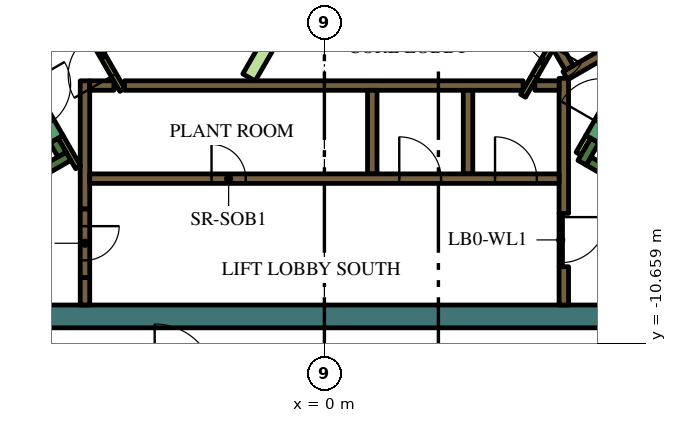
"""IFC4 building model, lengths in metres.
Left out: names, types, materials, properties, quantities, classifications, styles, units other than length and angle.
Written with IfcOpenShell. Run it as: python <this file> out.ifc"""

import sys

from ifc_helpers import new_model, si_unit, direction, frame, frame_2d, origin, origin_2d, place, context, subcontext, project, spatial, polyline, rectangle, outline, extrude, element, fill, save


model = new_model("IFC4")
c1 = context("Model", 3, precision=1e-05, world=origin(), true_north=direction((0.0, 1.0)))
c2 = subcontext(c1, "Body", "Model", "MODEL_VIEW")
j1 = project(units=[si_unit("LENGTHUNIT", "METRE"), si_unit("PLANEANGLEUNIT", "RADIAN")], contexts=[c1])
p1 = place(None, origin())
s1 = spatial("IfcSite", under=j1, at=p1, CompositionType="ELEMENT")
p2 = place(p1, origin())
s2 = spatial("IfcBuilding", under=s1, at=p2, CompositionType="ELEMENT")
p3 = place(p2, frame((0.0, 0.0, 344.4)))
s3 = spatial("IfcBuildingStorey", under=s2, at=p3, CompositionType="ELEMENT", Elevation=344.4)
p4 = place(p3, frame((8.904, -9.95, 0.0), z_axis=(0.0, 0.0, 1.0), x_axis=(-1.0, 0.0, 0.0)))
e1 = element("IfcWall", 1, at=p4, inside=s3, PredefinedType="SOLIDWALL", context=c2, shape_type="SweptSolid", body=[
    extrude(rectangle(XDim=22.161, YDim=0.6, at=frame_2d((11.081, 0.0))), origin(), (0.0, 0.0, 1.0), 4.2),
])
p5 = place(p3, frame((12.84, -9.261, 0.0), z_axis=(0.0, 0.0, 1.0), x_axis=(-0.866013990052, 0.500019768644, 0.0)))
e2 = element("IfcWall", 2, at=p5, inside=s3, PredefinedType="SOLIDWALL", context=c2, shape_type="SweptSolid", body=[
    extrude(rectangle(XDim=6.8, YDim=0.25, at=frame_2d((3.4, 0.0))), origin(), (0.0, 0.0, 1.0), 4.2),
])
p6 = place(p3, frame((6.78, -5.906, 0.0), z_axis=(0.0, 0.0, 1.0), x_axis=(0.500223362819, 0.865896406789, 0.0)))
e3 = element("IfcWall", 3, at=p6, inside=s3, PredefinedType="SOLIDWALL", context=c2, shape_type="SweptSolid", body=[
    extrude(rectangle(XDim=0.675, YDim=0.25, at=frame_2d((0.337, 0.0))), origin(), (0.0, 0.0, 1.0), 4.2),
])
p7 = place(p3, frame((-12.84, -9.261, 0.0), z_axis=(0.0, 0.0, 1.0), x_axis=(0.866016039709, 0.500016218704, 0.0)))
e4 = element("IfcWall", 4, at=p7, inside=s3, PredefinedType="SOLIDWALL", context=c2, shape_type="SweptSolid", body=[
    extrude(rectangle(XDim=7.05, YDim=0.25, at=frame_2d((3.525, 0.0))), origin(), (0.0, 0.0, 1.0), 4.2),
])
p8 = place(p3, frame((-6.905, -5.69, 0.0), z_axis=(0.0, 0.0, 1.0), x_axis=(-0.500402024738, 0.865793170242, 0.0)))
e5 = element("IfcWall", 5, at=p8, inside=s3, PredefinedType="SOLIDWALL", context=c2, shape_type="SweptSolid", body=[
    extrude(rectangle(XDim=0.425, YDim=0.25, at=frame_2d((0.212, 0.0))), origin(), (0.0, 0.0, 1.0), 4.2),
])
p9 = place(p3, frame((6.3, -7.24, 0.0), z_axis=(0.0, 0.0, 1.0), x_axis=(0.0, 1.0, 0.0)))
e6 = element("IfcWall", 6, at=p9, inside=s3, PredefinedType="SOLIDWALL", context=c2, shape_type="SweptSolid", body=[
    extrude(rectangle(XDim=3.556, YDim=0.25, at=frame_2d((1.778, 0.0))), origin(), (0.0, 0.0, 1.0), 4.2),
])
p10 = place(p3, frame((6.3, -9.65, 0.0), z_axis=(0.0, 0.0, 1.0), x_axis=(0.0, 1.0, 0.0)))
e7 = element("IfcWall", 7, at=p10, inside=s3, PredefinedType="SOLIDWALL", context=c2, shape_type="SweptSolid", body=[
    extrude(rectangle(XDim=1.008, YDim=0.25, at=frame_2d((0.504, 0.0))), origin(), (0.0, 0.0, 1.0), 4.2),
])
p11 = place(p3, frame((5.538, -3.875, 0.0), z_axis=(0.0, 0.0, 1.0), x_axis=(1.0, 0.0, 0.0)))
e8 = element("IfcWall", 8, at=p11, inside=s3, PredefinedType="SOLIDWALL", context=c2, shape_type="SweptSolid", body=[
    extrude(rectangle(XDim=0.637, YDim=0.25, at=frame_2d((0.318, 0.0))), origin(), (0.0, 0.0, 1.0), 4.2),
])
p12 = place(p3, frame((-5.259, -3.875, 0.0), z_axis=(0.0, 0.0, 1.0), x_axis=(1.0, 0.0, 0.0)))
e9 = element("IfcWall", 9, at=p12, inside=s3, PredefinedType="SOLIDWALL", context=c2, shape_type="SweptSolid", body=[
    extrude(rectangle(XDim=10.489, YDim=0.25, at=frame_2d((5.244, 0.0))), origin(), (0.0, 0.0, 1.0), 4.2),
])
for number, where, z_axis, x_axis in (
    (10, (1.26, -4.0, 0.0), (0.0, 0.0, 1.0), (0.0, -1.0, 0.0)),
    (11, (3.78, -4.0, 0.0), (0.0, 0.0, 1.0), (0.0, -1.0, 0.0)),
):
    element("IfcWall", number, at=place(p3, frame(where, z_axis=z_axis, x_axis=x_axis)), inside=s3, PredefinedType="SOLIDWALL", context=c2, shape_type="SweptSolid", body=[
        extrude(rectangle(XDim=2.2, YDim=0.25, at=frame_2d((1.1, 0.0))), origin(), (0.0, 0.0, 1.0), 4.2),
    ])
p13 = place(p3, frame((-6.3, -7.125, 0.0), z_axis=(0.0, 0.0, 1.0), x_axis=(0.0, 1.0, 0.0)))
e12 = element("IfcWall", 12, at=p13, inside=s3, PredefinedType="SOLIDWALL", context=c2, shape_type="SweptSolid", body=[
    extrude(rectangle(XDim=3.375, YDim=0.25, at=frame_2d((1.687, 0.0))), origin(), (0.0, 0.0, 1.0), 4.2),
])
p14 = place(p3, frame((-6.175, -3.875, 0.0), z_axis=(0.0, 0.0, 1.0), x_axis=(1.0, 0.0, 0.0)))
e13 = element("IfcWall", 13, at=p14, inside=s3, PredefinedType="SOLIDWALL", context=c2, shape_type="SweptSolid", body=[
    extrude(rectangle(XDim=0.637, YDim=0.25, at=frame_2d((0.318, 0.0))), origin(), (0.0, 0.0, 1.0), 4.2),
])
p15 = place(p3, frame((-6.3, -8.925, 0.0), z_axis=(0.0, 0.0, 1.0), x_axis=(0.0, -1.0, 0.0)))
e14 = element("IfcWall", 14, at=p15, inside=s3, PredefinedType="SOLIDWALL", context=c2, shape_type="SweptSolid", body=[
    extrude(rectangle(XDim=0.725, YDim=0.25, at=frame_2d((0.363, 0.0))), origin(), (0.0, 0.0, 1.0), 4.2),
])
p16 = place(p3, frame((9.19, -1.969, 0.0), z_axis=(0.0, 0.0, 1.0), x_axis=(-0.866057109641, -0.499945079824, 0.0)))
e15 = element("IfcWall", 15, at=p16, inside=s3, PredefinedType="SOLIDWALL", context=c2, shape_type="SweptSolid", body=[
    extrude(rectangle(XDim=3.291, YDim=0.25, at=frame_2d((1.646, 0.0))), origin(), (0.0, 0.0, 1.0), 4.2),
])
p17 = place(p3, frame((6.13, -2.867, 0.0), z_axis=(0.0, 0.0, 1.0), x_axis=(0.500160776593, -0.865932559475, 0.0)))
e16 = element("IfcWall", 16, at=p17, inside=s3, PredefinedType="SOLIDWALL", context=c2, shape_type="SweptSolid", body=[
    extrude(rectangle(XDim=0.627, YDim=0.25, at=frame_2d((0.313, 0.0))), origin(), (0.0, 0.0, 1.0), 4.2),
])
p18 = place(p3, frame((-6.48, -6.027, 0.0), z_axis=(0.0, 0.0, 1.0), x_axis=(-0.499927229454, 0.866067413802, 0.0)))
e17 = element("IfcWall", 17, at=p18, inside=s3, PredefinedType="PARTITIONING", context=c2, shape_type="SweptSolid", body=[
    extrude(rectangle(XDim=0.929, YDim=0.15, at=frame_2d((0.464, 0.0))), origin(), (0.0, 0.0, 1.0), 4.2),
])
p19 = place(p3, frame((6.945, -5.222, 0.0), z_axis=(0.0, 0.0, 1.0), x_axis=(-0.499818422106, -0.866130212453, 0.0)))
e18 = element("IfcWall", 18, at=p19, inside=s3, PredefinedType="PARTITIONING", context=c2, shape_type="SweptSolid", body=[
    extrude(rectangle(XDim=0.514, YDim=0.15, at=frame_2d((0.257, 0.0))), origin(), (0.0, 0.0, 1.0), 3.3),
])
p20 = place(p3, origin())
e19 = element("IfcWall", 19, at=p20, inside=s3, PredefinedType="PARTITIONING", context=c2, shape_type="SweptSolid", body=[
    extrude(outline(polyline([(2.017, 3.643), (2.342, 3.456), (-1.822, -3.756), (-2.147, -3.568), (2.017, 3.643)])), origin(), (0.0, 0.0, 1.0), 3.3),
])
p21 = place(p3, frame((-6.175, -6.325, 0.0), z_axis=(0.0, 0.0, 1.0), x_axis=(1.0, 0.0, 0.0)))
e20 = element("IfcWall", 20, at=p21, inside=s3, PredefinedType="SOLIDWALL", context=c2, shape_type="SweptSolid", body=[
    extrude(rectangle(XDim=12.35, YDim=0.25, at=frame_2d((6.175, 0.0))), origin(), (0.0, 0.0, 1.0), 4.2),
])
p22 = place(p21, frame((3.205, 0.0, 0.0)))
e21 = element("IfcOpeningElement", 21, at=p22, cuts=e20, PredefinedType="OPENING", context=c2, shape_type="SweptSolid", body=[
    extrude(rectangle(XDim=0.9, YDim=2.1, at=frame_2d((0.45, 1.05))), frame((0.0, 0.135, 0.0), z_axis=(0.0, -1.0, 0.0), x_axis=(1.0, 0.0, 0.0)), (0.0, 0.0, 1.0), 0.27),
])
p23 = place(p21, frame((8.145, 0.0, 0.0)))
e22 = element("IfcOpeningElement", 22, at=p23, cuts=e20, PredefinedType="OPENING", context=c2, shape_type="SweptSolid", body=[
    extrude(rectangle(XDim=1.1, YDim=2.1, at=frame_2d((0.55, 1.05))), frame((0.0, 0.135, 0.0), z_axis=(0.0, -1.0, 0.0), x_axis=(1.0, 0.0, 0.0)), (0.0, 0.0, 1.0), 0.27),
])
p24 = place(p21, frame((10.665, 0.0, 0.0)))
e23 = element("IfcOpeningElement", 23, at=p24, cuts=e20, PredefinedType="OPENING", context=c2, shape_type="SweptSolid", body=[
    extrude(rectangle(XDim=1.1, YDim=2.1, at=frame_2d((0.55, 1.05))), frame((0.0, 0.135, 0.0), z_axis=(0.0, -1.0, 0.0), x_axis=(1.0, 0.0, 0.0)), (0.0, 0.0, 1.0), 0.27),
])
p25 = place(p3, frame((7.053, -5.284, 0.0), z_axis=(0.0, 0.0, 1.0), x_axis=(0.500078061341, 0.865980330357, 0.0)))
e24 = element("IfcWall", 24, at=p25, inside=s3, PredefinedType="SOLIDWALL", context=c2, shape_type="SweptSolid", body=[
    extrude(rectangle(XDim=2.1, YDim=0.4, at=frame_2d((1.05, 0.0))), origin(), (0.0, 0.0, 1.0), 4.2),
])
p26 = place(p25, frame((0.45, 0.0, 0.0)))
e25 = element("IfcOpeningElement", 25, at=p26, cuts=e24, PredefinedType="OPENING", context=c2, shape_type="SweptSolid", body=[
    extrude(rectangle(XDim=1.2, YDim=2.1, at=frame_2d((0.6, 1.05))), frame((0.0, 0.21, 0.0), z_axis=(0.0, -1.0, 0.0), x_axis=(1.0, 0.0, 0.0)), (0.0, 0.0, 1.0), 0.42),
])
p27 = place(p3, frame((-8.103, -3.466, 0.0), z_axis=(0.0, 0.0, 1.0), x_axis=(0.500078061341, -0.865980330357, 0.0)))
e26 = element("IfcWall", 26, at=p27, inside=s3, PredefinedType="SOLIDWALL", context=c2, shape_type="SweptSolid", body=[
    extrude(rectangle(XDim=2.1, YDim=0.4, at=frame_2d((1.05, 0.0))), origin(), (0.0, 0.0, 1.0), 4.2),
])
p28 = place(p27, frame((0.45, 0.0, 0.0)))
e27 = element("IfcOpeningElement", 27, at=p28, cuts=e26, PredefinedType="OPENING", context=c2, shape_type="SweptSolid", body=[
    extrude(rectangle(XDim=1.2, YDim=2.1, at=frame_2d((0.6, 1.05))), frame((0.0, 0.21, 0.0), z_axis=(0.0, -1.0, 0.0), x_axis=(1.0, 0.0, 0.0)), (0.0, 0.0, 1.0), 0.42),
])
p29 = place(p3, frame((-6.3, -7.125, 0.0), z_axis=(0.0, 0.0, 1.0), x_axis=(0.0, -1.0, 0.0)))
e28 = element("IfcWall", 28, at=p29, inside=s3, PredefinedType="SOLIDWALL", context=c2, shape_type="SweptSolid", body=[
    extrude(rectangle(XDim=1.8, YDim=0.25, at=frame_2d((0.9, 0.0))), origin(), (0.0, 0.0, 1.0), 4.2),
])
p30 = place(p29, frame((0.45, 0.0, 0.0)))
e29 = element("IfcOpeningElement", 29, at=p30, cuts=e28, PredefinedType="OPENING", context=c2, shape_type="SweptSolid", body=[
    extrude(rectangle(XDim=0.9, YDim=2.1, at=frame_2d((0.45, 1.05))), frame((0.0, 0.135, 0.0), z_axis=(0.0, -1.0, 0.0), x_axis=(1.0, 0.0, 0.0)), (0.0, 0.0, 1.0), 0.27),
])
p31 = place(p3, frame((6.203, -2.456, 0.0), z_axis=(0.0, 0.0, 1.0), x_axis=(-0.500043961785, -0.866000020948, 0.0)))
e30 = element("IfcWall", 30, at=p31, inside=s3, PredefinedType="PARTITIONING", context=c2, shape_type="SweptSolid", body=[
    extrude(rectangle(XDim=1.95, YDim=0.15, at=frame_2d((0.975, 0.0))), origin(), (0.0, 0.0, 1.0), 4.2),
])
p32 = place(p31, frame((0.45, 0.0, 0.0)))
e31 = element("IfcOpeningElement", 31, at=p32, cuts=e30, PredefinedType="OPENING", context=c2, shape_type="SweptSolid", body=[
    extrude(rectangle(XDim=0.9, YDim=2.1, at=frame_2d((0.45, 1.05))), frame((0.0, 0.085, 0.0), z_axis=(0.0, -1.0, 0.0), x_axis=(1.0, 0.0, 0.0)), (0.0, 0.0, 1.0), 0.17),
])
p33 = place(p3, frame((-5.317, -3.99, 0.0), z_axis=(0.0, 0.0, 1.0), x_axis=(-0.500027713859, 0.866009402589, 0.0)))
e32 = element("IfcWall", 32, at=p33, inside=s3, PredefinedType="PARTITIONING", context=c2, shape_type="SweptSolid", body=[
    extrude(rectangle(XDim=2.1, YDim=0.15, at=frame_2d((1.05, 0.0))), origin(), (0.0, 0.0, 1.0), 4.2),
])
p34 = place(p33, frame((0.45, 0.0, 0.0)))
e33 = element("IfcOpeningElement", 33, at=p34, cuts=e32, PredefinedType="OPENING", context=c2, shape_type="SweptSolid", body=[
    extrude(rectangle(XDim=1.2, YDim=2.1, at=frame_2d((0.6, 1.05))), frame((0.0, 0.085, 0.0), z_axis=(0.0, -1.0, 0.0), x_axis=(1.0, 0.0, 0.0)), (0.0, 0.0, 1.0), 0.17),
])
p35 = place(p3, frame((6.22, -7.237, 0.0), z_axis=(0.0, 0.0, 1.0), x_axis=(0.0, -1.0, 0.0)))
e34 = element("IfcWall", 34, at=p35, inside=s3, PredefinedType="PARTITIONING", context=c2, shape_type="SweptSolid", body=[
    extrude(rectangle(XDim=1.4, YDim=0.09, at=frame_2d((0.7, 0.0))), origin(), (0.0, 0.0, 1.0), 3.3),
])
p36 = place(p35, frame((0.1, 0.0, 0.0)))
e35 = element("IfcOpeningElement", 35, at=p36, cuts=e34, PredefinedType="OPENING", context=c2, shape_type="SweptSolid", body=[
    extrude(rectangle(XDim=1.2, YDim=2.1, at=frame_2d((0.6, 1.05))), frame((0.0, 0.055, 0.0), z_axis=(0.0, -1.0, 0.0), x_axis=(1.0, 0.0, 0.0)), (0.0, 0.0, 1.0), 0.11),
])
p37 = place(p3, frame((17.234, -6.35, 0.0), z_axis=(0.0, 0.0, 1.0), x_axis=(-0.499998496574, 0.866026271786, 0.0)))
e36 = element("IfcWall", 36, at=p37, inside=s3, PredefinedType="PARTITIONING", context=c2, shape_type="SweptSolid", body=[
    extrude(rectangle(XDim=20.9, YDim=0.2, at=frame_2d((10.45, 0.0))), origin(), (0.0, 0.0, 1.0), 3.3),
])
p38 = place(p37, frame((9.65, 0.0, 0.0)))
e37 = element("IfcOpeningElement", 37, at=p38, cuts=e36, PredefinedType="OPENING", context=c2, shape_type="SweptSolid", body=[
    extrude(rectangle(XDim=1.6, YDim=2.1, at=frame_2d((0.8, 1.05))), frame((0.0, 0.11, 0.0), z_axis=(0.0, -1.0, 0.0), x_axis=(1.0, 0.0, 0.0)), (0.0, 0.0, 1.0), 0.22),
])
p39 = place(p22, origin())
e38 = element("IfcDoor", 38, at=p39, inside=s3, OperationType="SINGLE_SWING_LEFT", PredefinedType="DOOR", context=c2, shape_type="SweptSolid", body=[
    extrude(rectangle(XDim=0.9, YDim=2.1, at=frame_2d((0.45, 1.05))), frame((0.0, 0.025, 0.0), z_axis=(0.0, -1.0, 0.0), x_axis=(1.0, 0.0, 0.0)), (0.0, 0.0, 1.0), 0.05),
])
fill(e21, e38)
p40 = place(p23, origin())
e39 = element("IfcDoor", 39, at=p40, inside=s3, OperationType="DOUBLE_DOOR_SLIDING", PredefinedType="DOOR", context=c2, shape_type="SweptSolid", body=[
    extrude(rectangle(XDim=1.1, YDim=2.1, at=frame_2d((0.55, 1.05))), frame((0.0, 0.025, 0.0), z_axis=(0.0, -1.0, 0.0), x_axis=(1.0, 0.0, 0.0)), (0.0, 0.0, 1.0), 0.05),
])
fill(e22, e39)
p41 = place(p24, origin())
e40 = element("IfcDoor", 40, at=p41, inside=s3, OperationType="DOUBLE_DOOR_SLIDING", PredefinedType="DOOR", context=c2, shape_type="SweptSolid", body=[
    extrude(rectangle(XDim=1.1, YDim=2.1, at=frame_2d((0.55, 1.05))), frame((0.0, 0.025, 0.0), z_axis=(0.0, -1.0, 0.0), x_axis=(1.0, 0.0, 0.0)), (0.0, 0.0, 1.0), 0.05),
])
fill(e23, e40)
p42 = place(p30, origin())
e41 = element("IfcDoor", 41, at=p42, inside=s3, OperationType="SINGLE_SWING_LEFT", PredefinedType="DOOR", context=c2, shape_type="SweptSolid", body=[
    extrude(rectangle(XDim=0.9, YDim=2.1, at=frame_2d((0.45, 1.05))), frame((0.0, 0.025, 0.0), z_axis=(0.0, -1.0, 0.0), x_axis=(1.0, 0.0, 0.0)), (0.0, 0.0, 1.0), 0.05),
])
fill(e29, e41)
p43 = place(p32, origin())
e42 = element("IfcDoor", 42, at=p43, inside=s3, OperationType="SINGLE_SWING_LEFT", PredefinedType="DOOR", context=c2, shape_type="SweptSolid", body=[
    extrude(rectangle(XDim=0.9, YDim=2.1, at=frame_2d((0.45, 1.05))), frame((0.0, 0.025, 0.0), z_axis=(0.0, -1.0, 0.0), x_axis=(1.0, 0.0, 0.0)), (0.0, 0.0, 1.0), 0.05),
])
fill(e31, e42)
p44 = place(p34, origin())
e43 = element("IfcDoor", 43, at=p44, inside=s3, OperationType="SINGLE_SWING_LEFT", PredefinedType="DOOR", context=c2, shape_type="SweptSolid", body=[
    extrude(rectangle(XDim=1.2, YDim=2.1, at=frame_2d((0.6, 1.05))), frame((0.0, 0.025, 0.0), z_axis=(0.0, -1.0, 0.0), x_axis=(1.0, 0.0, 0.0)), (0.0, 0.0, 1.0), 0.05),
])
fill(e33, e43)
p45 = place(p36, origin())
e44 = element("IfcDoor", 44, at=p45, inside=s3, OperationType="SINGLE_SWING_LEFT", PredefinedType="DOOR", context=c2, shape_type="SweptSolid", body=[
    extrude(rectangle(XDim=1.2, YDim=2.1, at=frame_2d((0.6, 1.05))), frame((0.0, 0.025, 0.0), z_axis=(0.0, -1.0, 0.0), x_axis=(1.0, 0.0, 0.0)), (0.0, 0.0, 1.0), 0.05),
])
fill(e35, e44)
p46 = place(p2, frame((0.0, 0.0, 348.6)))
p47 = place(p46, origin())
p48 = place(p47, frame((10.695, -6.175, 0.0)))
p49 = place(p48, frame((0.0, 0.0, 1.15)))
e45 = element("IfcWindow", 45, at=p49, inside=s3, PartitioningType="SINGLE_PANEL", PredefinedType="WINDOW", context=c2, shape_type="SweptSolid", body=[
    extrude(rectangle(XDim=7.364, YDim=5.955, at=origin_2d()), origin(), (0.0, 0.0, 1.0), 0.05),
])
p50 = place(p47, frame((-10.695, -6.175, 0.0)))
p51 = place(p50, frame((0.0, 0.0, 1.15)))
e46 = element("IfcWindow", 46, at=p51, inside=s3, PartitioningType="SINGLE_PANEL", PredefinedType="WINDOW", context=c2, shape_type="SweptSolid", body=[
    extrude(rectangle(XDim=7.364, YDim=5.955, at=origin_2d()), origin(), (0.0, 0.0, 1.0), 0.05),
])
save(model, sys.argv[1])
